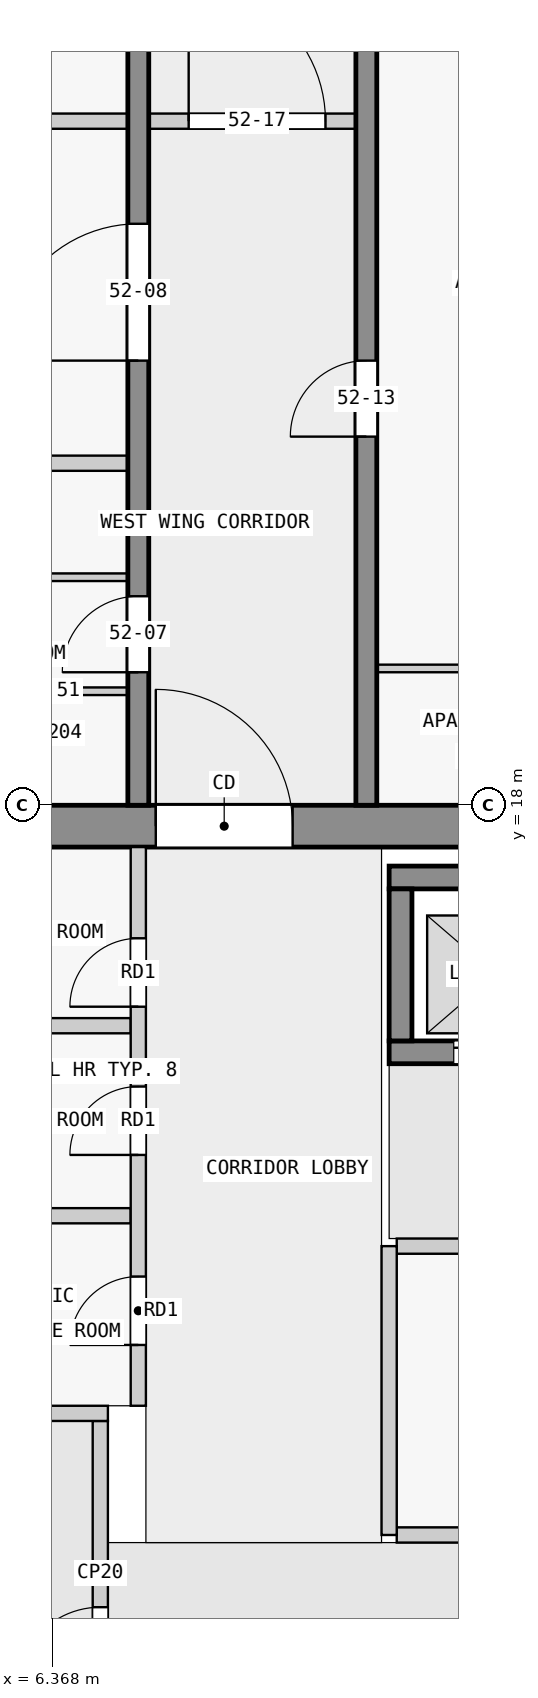
"""IFC4 building model, lengths in metres.
Left out: names, types, materials, properties, quantities, classifications, styles, units other than length and angle.
Written with IfcOpenShell. Run it as: python <this file> out.ifc"""

import sys

from ifc_helpers import new_model, si_unit, direction, frame, frame_2d, origin, place, context, subcontext, project, spatial, rectangle, extrude, element, fill, save


model = new_model("IFC4")
c1 = context("Model", 3, precision=1e-05, world=origin(), true_north=direction((0.0, 1.0)))
c2 = subcontext(c1, "Body", "Model", "MODEL_VIEW")
j1 = project(units=[si_unit("LENGTHUNIT", "METRE"), si_unit("PLANEANGLEUNIT", "RADIAN")], contexts=[c1])
p1 = place(None, origin())
s1 = spatial("IfcSite", under=j1, at=p1, CompositionType="ELEMENT")
p2 = place(p1, origin())
s2 = spatial("IfcBuilding", under=s1, at=p2, CompositionType="ELEMENT")
p3 = place(p2, frame((0.0, 0.0, 201.4)))
s3 = spatial("IfcBuildingStorey", under=s2, at=p3, CompositionType="ELEMENT", Elevation=201.4)
p4 = place(p3, frame((1.38, 17.725, 0.0), z_axis=(0.0, 0.0, 1.0), x_axis=(1.0, 0.0, 0.0)))
e1 = element("IfcWall", 1, at=p4, inside=s3, PredefinedType="SHEAR", context=c2, shape_type="SweptSolid", body=[
    extrude(rectangle(XDim=21.12, YDim=0.55, at=frame_2d((10.56, 0.0))), origin(), (0.0, 0.0, 1.0), 3.25),
])
p5 = place(p4, frame((6.35, 0.0, 0.0)))
e2 = element("IfcOpeningElement", 2, at=p5, cuts=e1, PredefinedType="OPENING", context=c2, shape_type="SweptSolid", body=[
    extrude(rectangle(XDim=1.8, YDim=2.1, at=frame_2d((0.9, 1.05))), frame((0.0, 0.285, 0.0), z_axis=(0.0, -1.0, 0.0), x_axis=(1.0, 0.0, 0.0)), (0.0, 0.0, 1.0), 0.57),
])
p6 = place(p3, frame((10.8, 17.05, 0.0), z_axis=(0.0, 0.0, 1.0), x_axis=(1.0, 0.0, 0.0)))
e3 = element("IfcWall", 3, at=p6, inside=s3, PredefinedType="SHEAR", context=c2, shape_type="SweptSolid", body=[
    extrude(rectangle(XDim=7.8, YDim=0.3, at=frame_2d((3.9, 0.0))), origin(), (0.0, 0.0, 1.0), 3.25),
])
p7 = place(p3, frame((10.8, 14.75, 0.0), z_axis=(0.0, 0.0, 1.0), x_axis=(1.0, 0.0, 0.0)))
e4 = element("IfcWall", 4, at=p7, inside=s3, PredefinedType="SHEAR", context=c2, shape_type="SweptSolid", body=[
    extrude(rectangle(XDim=7.8, YDim=0.3, at=frame_2d((3.9, 0.0))), origin(), (0.0, 0.0, 1.0), 3.25),
])
p8 = place(p7, frame((0.85, 0.0, 0.0)))
e5 = element("IfcOpeningElement", 5, at=p8, cuts=e4, PredefinedType="OPENING", context=c2, shape_type="SweptSolid", body=[
    extrude(rectangle(XDim=1.1, YDim=2.1, at=frame_2d((0.55, 1.05))), frame((0.0, 0.16, 0.0), z_axis=(0.0, -1.0, 0.0), x_axis=(1.0, 0.0, 0.0)), (0.0, 0.0, 1.0), 0.32),
])
p9 = place(p7, frame((3.35, 0.0, 0.0)))
e6 = element("IfcOpeningElement", 6, at=p9, cuts=e4, PredefinedType="OPENING", context=c2, shape_type="SweptSolid", body=[
    extrude(rectangle(XDim=1.1, YDim=2.1, at=frame_2d((0.55, 1.05))), frame((0.0, 0.16, 0.0), z_axis=(0.0, -1.0, 0.0), x_axis=(1.0, 0.0, 0.0)), (0.0, 0.0, 1.0), 0.32),
])
p10 = place(p7, frame((5.85, 0.0, 0.0)))
e7 = element("IfcOpeningElement", 7, at=p10, cuts=e4, PredefinedType="OPENING", context=c2, shape_type="SweptSolid", body=[
    extrude(rectangle(XDim=1.1, YDim=2.1, at=frame_2d((0.55, 1.05))), frame((0.0, 0.16, 0.0), z_axis=(0.0, -1.0, 0.0), x_axis=(1.0, 0.0, 0.0)), (0.0, 0.0, 1.0), 0.32),
])
p11 = place(p3, frame((10.95, 14.9, 0.0), z_axis=(0.0, 0.0, 1.0), x_axis=(0.0, 1.0, 0.0)))
e8 = element("IfcWall", 8, at=p11, inside=s3, PredefinedType="SHEAR", context=c2, shape_type="SweptSolid", body=[
    extrude(rectangle(XDim=2.0, YDim=0.3, at=frame_2d((1.0, 0.0))), origin(), (0.0, 0.0, 1.0), 3.25),
])
p12 = place(p3, frame((7.5, 18.0, 0.0), z_axis=(0.0, 0.0, 1.0), x_axis=(0.0, 1.0, 0.0)))
e9 = element("IfcWall", 9, at=p12, inside=s3, PredefinedType="SHEAR", context=c2, shape_type="SweptSolid", body=[
    extrude(rectangle(XDim=27.0, YDim=0.275, at=frame_2d((13.5, 0.0))), origin(), (0.0, 0.0, 1.0), 3.25),
])
p13 = place(p12, frame((1.75, 0.0, 0.0)))
e10 = element("IfcOpeningElement", 10, at=p13, cuts=e9, PredefinedType="OPENING", context=c2, shape_type="SweptSolid", body=[
    extrude(rectangle(XDim=1.0, YDim=2.1, at=frame_2d((0.5, 1.05))), frame((0.0, 0.147, 0.0), z_axis=(0.0, -1.0, 0.0), x_axis=(1.0, 0.0, 0.0)), (0.0, 0.0, 1.0), 0.295),
])
p14 = place(p12, frame((5.85, 0.0, 0.0)))
e11 = element("IfcOpeningElement", 11, at=p14, cuts=e9, PredefinedType="OPENING", context=c2, shape_type="SweptSolid", body=[
    extrude(rectangle(XDim=1.8, YDim=2.1, at=frame_2d((0.9, 1.05))), frame((0.0, 0.147, 0.0), z_axis=(0.0, -1.0, 0.0), x_axis=(1.0, 0.0, 0.0)), (0.0, 0.0, 1.0), 0.295),
])
p15 = place(p12, frame((13.05, 0.0, 0.0)))
e12 = element("IfcOpeningElement", 12, at=p15, cuts=e9, PredefinedType="OPENING", context=c2, shape_type="SweptSolid", body=[
    extrude(rectangle(XDim=1.0, YDim=2.1, at=frame_2d((0.5, 1.05))), frame((0.0, 0.147, 0.0), z_axis=(0.0, -1.0, 0.0), x_axis=(1.0, 0.0, 0.0)), (0.0, 0.0, 1.0), 0.295),
])
p16 = place(p12, frame((19.75, 0.0, 0.0)))
e13 = element("IfcOpeningElement", 13, at=p16, cuts=e9, PredefinedType="OPENING", context=c2, shape_type="SweptSolid", body=[
    extrude(rectangle(XDim=1.0, YDim=2.1, at=frame_2d((0.5, 1.05))), frame((0.0, 0.147, 0.0), z_axis=(0.0, -1.0, 0.0), x_axis=(1.0, 0.0, 0.0)), (0.0, 0.0, 1.0), 0.295),
])
p17 = place(p12, frame((23.25, 0.0, 0.0)))
e14 = element("IfcOpeningElement", 14, at=p17, cuts=e9, PredefinedType="OPENING", context=c2, shape_type="SweptSolid", body=[
    extrude(rectangle(XDim=0.9, YDim=2.1, at=frame_2d((0.45, 1.05))), frame((0.0, 0.147, 0.0), z_axis=(0.0, -1.0, 0.0), x_axis=(1.0, 0.0, 0.0)), (0.0, 0.0, 1.0), 0.295),
])
p18 = place(p12, frame((25.45, 0.0, 0.0)))
e15 = element("IfcOpeningElement", 15, at=p18, cuts=e9, PredefinedType="OPENING", context=c2, shape_type="SweptSolid", body=[
    extrude(rectangle(XDim=1.0, YDim=2.1, at=frame_2d((0.5, 1.05))), frame((0.0, 0.147, 0.0), z_axis=(0.0, -1.0, 0.0), x_axis=(1.0, 0.0, 0.0)), (0.0, 0.0, 1.0), 0.295),
])
p19 = place(p3, frame((10.5, 18.0, 0.0), z_axis=(0.0, 0.0, 1.0), x_axis=(0.0, 1.0, 0.0)))
e16 = element("IfcWall", 16, at=p19, inside=s3, PredefinedType="SHEAR", context=c2, shape_type="SweptSolid", body=[
    extrude(rectangle(XDim=27.0, YDim=0.275, at=frame_2d((13.5, 0.0))), origin(), (0.0, 0.0, 1.0), 3.25),
])
p20 = place(p19, frame((4.85, 0.0, 0.0)))
e17 = element("IfcOpeningElement", 17, at=p20, cuts=e16, PredefinedType="OPENING", context=c2, shape_type="SweptSolid", body=[
    extrude(rectangle(XDim=1.0, YDim=2.1, at=frame_2d((0.5, 1.05))), frame((0.0, 0.147, 0.0), z_axis=(0.0, -1.0, 0.0), x_axis=(1.0, 0.0, 0.0)), (0.0, 0.0, 1.0), 0.295),
])
p21 = place(p19, frame((15.25, 0.0, 0.0)))
e18 = element("IfcOpeningElement", 18, at=p21, cuts=e16, PredefinedType="OPENING", context=c2, shape_type="SweptSolid", body=[
    extrude(rectangle(XDim=1.0, YDim=2.1, at=frame_2d((0.5, 1.05))), frame((0.0, 0.147, 0.0), z_axis=(0.0, -1.0, 0.0), x_axis=(1.0, 0.0, 0.0)), (0.0, 0.0, 1.0), 0.295),
])
p22 = place(p19, frame((21.35, 0.0, 0.0)))
e19 = element("IfcOpeningElement", 19, at=p22, cuts=e16, PredefinedType="OPENING", context=c2, shape_type="SweptSolid", body=[
    extrude(rectangle(XDim=1.0, YDim=2.1, at=frame_2d((0.5, 1.05))), frame((0.0, 0.147, 0.0), z_axis=(0.0, -1.0, 0.0), x_axis=(1.0, 0.0, 0.0)), (0.0, 0.0, 1.0), 0.295),
])
p23 = place(p3, frame((7.0, 5.9, 0.0), z_axis=(0.0, 0.0, 1.0), x_axis=(0.0, 1.0, 0.0)))
e20 = element("IfcWall", 20, at=p23, inside=s3, PredefinedType="PARTITIONING", context=c2, shape_type="SweptSolid", body=[
    extrude(rectangle(XDim=4.0, YDim=0.2, at=frame_2d((2.0, 0.0))), origin(), (0.0, 0.0, 1.0), 3.25),
])
p24 = place(p23, frame((0.45, 0.0, 0.0)))
e21 = element("IfcOpeningElement", 21, at=p24, cuts=e20, PredefinedType="OPENING", context=c2, shape_type="SweptSolid", body=[
    extrude(rectangle(XDim=1.1, YDim=2.1, at=frame_2d((0.55, 1.05))), frame((0.0, 0.11, 0.0), z_axis=(0.0, -1.0, 0.0), x_axis=(1.0, 0.0, 0.0)), (0.0, 0.0, 1.0), 0.22),
])
p25 = place(p3, frame((5.15, 10.0, 0.0), z_axis=(0.0, 0.0, 1.0), x_axis=(1.0, 0.0, 0.0)))
e22 = element("IfcWall", 22, at=p25, inside=s3, PredefinedType="PARTITIONING", context=c2, shape_type="SweptSolid", body=[
    extrude(rectangle(XDim=1.95, YDim=0.2, at=frame_2d((0.975, 0.0))), origin(), (0.0, 0.0, 1.0), 3.25),
])
p26 = place(p3, frame((10.8, 8.4, 0.0), z_axis=(0.0, 0.0, 1.0), x_axis=(0.0, 1.0, 0.0)))
e23 = element("IfcWall", 23, at=p26, inside=s3, PredefinedType="PARTITIONING", context=c2, shape_type="SweptSolid", body=[
    extrude(rectangle(XDim=3.8, YDim=0.2, at=frame_2d((1.9, 0.0))), origin(), (0.0, 0.0, 1.0), 3.25),
])
p27 = place(p3, frame((10.9, 8.4, 0.0), z_axis=(0.0, 0.0, 1.0), x_axis=(1.0, 0.0, 0.0)))
e24 = element("IfcWall", 24, at=p27, inside=s3, PredefinedType="PARTITIONING", context=c2, shape_type="SweptSolid", body=[
    extrude(rectangle(XDim=8.55, YDim=0.2, at=frame_2d((4.275, 0.0))), origin(), (0.0, 0.0, 1.0), 3.25),
])
p28 = place(p3, frame((10.9, 12.2, 0.0), z_axis=(0.0, 0.0, 1.0), x_axis=(1.0, 0.0, 0.0)))
e25 = element("IfcWall", 25, at=p28, inside=s3, PredefinedType="PARTITIONING", context=c2, shape_type="SweptSolid", body=[
    extrude(rectangle(XDim=8.55, YDim=0.2, at=frame_2d((4.275, 0.0))), origin(), (0.0, 0.0, 1.0), 3.25),
])
p29 = place(p28, frame((1.425, 0.0, 0.0)))
e26 = element("IfcOpeningElement", 26, at=p29, cuts=e25, PredefinedType="OPENING", context=c2, shape_type="SweptSolid", body=[
    extrude(rectangle(XDim=0.9, YDim=2.1, at=frame_2d((0.45, 1.05))), frame((0.0, 0.11, 0.0), z_axis=(0.0, -1.0, 0.0), x_axis=(1.0, 0.0, 0.0)), (0.0, 0.0, 1.0), 0.22),
])
p30 = place(p28, frame((5.8, 0.0, 0.0)))
e27 = element("IfcOpeningElement", 27, at=p30, cuts=e25, PredefinedType="OPENING", context=c2, shape_type="SweptSolid", body=[
    extrude(rectangle(XDim=0.9, YDim=2.1, at=frame_2d((0.45, 1.05))), frame((0.0, 0.11, 0.0), z_axis=(0.0, -1.0, 0.0), x_axis=(1.0, 0.0, 0.0)), (0.0, 0.0, 1.0), 0.22),
])
p31 = place(p3, frame((7.5, 10.1, 0.0), z_axis=(0.0, 0.0, 1.0), x_axis=(0.0, 1.0, 0.0)))
e28 = element("IfcWall", 28, at=p31, inside=s3, PredefinedType="PARTITIONING", context=c2, shape_type="SweptSolid", body=[
    extrude(rectangle(XDim=7.35, YDim=0.2, at=frame_2d((3.675, 0.0))), origin(), (0.0, 0.0, 1.0), 3.25),
])
p32 = place(p31, frame((0.8, 0.0, 0.0)))
e29 = element("IfcOpeningElement", 29, at=p32, cuts=e28, PredefinedType="OPENING", context=c2, shape_type="SweptSolid", body=[
    extrude(rectangle(XDim=0.9, YDim=2.1, at=frame_2d((0.45, 1.05))), frame((0.0, 0.11, 0.0), z_axis=(0.0, -1.0, 0.0), x_axis=(1.0, 0.0, 0.0)), (0.0, 0.0, 1.0), 0.22),
])
p33 = place(p31, frame((3.3, 0.0, 0.0)))
e30 = element("IfcOpeningElement", 30, at=p33, cuts=e28, PredefinedType="OPENING", context=c2, shape_type="SweptSolid", body=[
    extrude(rectangle(XDim=0.9, YDim=2.1, at=frame_2d((0.45, 1.05))), frame((0.0, 0.11, 0.0), z_axis=(0.0, -1.0, 0.0), x_axis=(1.0, 0.0, 0.0)), (0.0, 0.0, 1.0), 0.22),
])
p34 = place(p31, frame((5.25, 0.0, 0.0)))
e31 = element("IfcOpeningElement", 31, at=p34, cuts=e28, PredefinedType="OPENING", context=c2, shape_type="SweptSolid", body=[
    extrude(rectangle(XDim=0.9, YDim=2.1, at=frame_2d((0.45, 1.05))), frame((0.0, 0.11, 0.0), z_axis=(0.0, -1.0, 0.0), x_axis=(1.0, 0.0, 0.0)), (0.0, 0.0, 1.0), 0.22),
])
for number, where, z_axis, x_axis in (
    (32, (5.15, 12.6, 0.0), (0.0, 0.0, 1.0), (1.0, 0.0, 0.0)),
    (33, (5.15, 15.1, 0.0), (0.0, 0.0, 1.0), (1.0, 0.0, 0.0)),
):
    element("IfcWall", number, at=place(p3, frame(where, z_axis=z_axis, x_axis=x_axis)), inside=s3, PredefinedType="PARTITIONING", context=c2, shape_type="SweptSolid", body=[
        extrude(rectangle(XDim=2.25, YDim=0.2, at=frame_2d((1.125, 0.0))), origin(), (0.0, 0.0, 1.0), 3.25),
    ])
p35 = place(p3, frame((7.363, 19.5, 0.0), z_axis=(0.0, 0.0, 1.0), x_axis=(-1.0, 0.0, 0.0)))
e34 = element("IfcWall", 34, at=p35, inside=s3, PredefinedType="PARTITIONING", context=c2, shape_type="SweptSolid", body=[
    extrude(rectangle(XDim=3.4, YDim=0.1, at=frame_2d((1.7, 0.0))), origin(), (0.0, 0.0, 1.0), 3.25),
])
p36 = place(p35, frame((1.25, 0.0, 0.0)))
e35 = element("IfcOpeningElement", 35, at=p36, cuts=e34, PredefinedType="OPENING", context=c2, shape_type="SweptSolid", body=[
    extrude(rectangle(XDim=0.9, YDim=2.1, at=frame_2d((0.45, 1.05))), frame((0.0, 0.06, 0.0), z_axis=(0.0, -1.0, 0.0), x_axis=(1.0, 0.0, 0.0)), (0.0, 0.0, 1.0), 0.12),
])
p37 = place(p3, frame((14.038, 19.8, 0.0), z_axis=(0.0, 0.0, 1.0), x_axis=(-1.0, 0.0, 0.0)))
e36 = element("IfcWall", 36, at=p37, inside=s3, PredefinedType="PARTITIONING", context=c2, shape_type="SweptSolid", body=[
    extrude(rectangle(XDim=3.4, YDim=0.1, at=frame_2d((1.7, 0.0))), origin(), (0.0, 0.0, 1.0), 3.25),
])
p38 = place(p37, frame((1.25, 0.0, 0.0)))
e37 = element("IfcOpeningElement", 37, at=p38, cuts=e36, PredefinedType="OPENING", context=c2, shape_type="SweptSolid", body=[
    extrude(rectangle(XDim=0.9, YDim=2.1, at=frame_2d((0.45, 1.05))), frame((0.0, 0.06, 0.0), z_axis=(0.0, -1.0, 0.0), x_axis=(1.0, 0.0, 0.0)), (0.0, 0.0, 1.0), 0.12),
])
p39 = place(p3, frame((3.962, 21.0, 0.0), z_axis=(0.0, 0.0, 1.0), x_axis=(1.0, 0.0, 0.0)))
e38 = element("IfcWall", 38, at=p39, inside=s3, PredefinedType="PARTITIONING", context=c2, shape_type="SweptSolid", body=[
    extrude(rectangle(XDim=3.4, YDim=0.1, at=frame_2d((1.7, 0.0))), origin(), (0.0, 0.0, 1.0), 3.25),
])
p40 = place(p39, frame((1.25, 0.0, 0.0)))
e39 = element("IfcOpeningElement", 39, at=p40, cuts=e38, PredefinedType="OPENING", context=c2, shape_type="SweptSolid", body=[
    extrude(rectangle(XDim=0.9, YDim=2.1, at=frame_2d((0.45, 1.05))), frame((0.0, 0.06, 0.0), z_axis=(0.0, -1.0, 0.0), x_axis=(1.0, 0.0, 0.0)), (0.0, 0.0, 1.0), 0.12),
])
p41 = place(p3, frame((7.363, 22.5, 0.0), z_axis=(0.0, 0.0, 1.0), x_axis=(-1.0, 0.0, 0.0)))
e40 = element("IfcWall", 40, at=p41, inside=s3, PredefinedType="PARTITIONING", context=c2, shape_type="SweptSolid", body=[
    extrude(rectangle(XDim=3.3, YDim=0.2, at=frame_2d((1.65, 0.0))), origin(), (0.0, 0.0, 1.0), 3.25),
])
p42 = place(p3, frame((7.363, 27.0, 0.0), z_axis=(0.0, 0.0, 1.0), x_axis=(-1.0, 0.0, 0.0)))
e41 = element("IfcWall", 41, at=p42, inside=s3, PredefinedType="PARTITIONING", context=c2, shape_type="SweptSolid", body=[
    extrude(rectangle(XDim=7.443, YDim=0.2, at=frame_2d((3.721, 0.0))), origin(), (0.0, 0.0, 1.0), 3.25),
])
p43 = place(p3, frame((7.462, 27.0, 0.0), z_axis=(0.0, 0.0, 1.0), x_axis=(1.0, 0.0, 0.0)))
e42 = element("IfcWall", 42, at=p43, inside=s3, PredefinedType="PARTITIONING", context=c2, shape_type="SweptSolid", body=[
    extrude(rectangle(XDim=3.175, YDim=0.2, at=frame_2d((1.587, 0.0))), origin(), (0.0, 0.0, 1.0), 3.25),
])
p44 = place(p43, frame((0.7, 0.0, 0.0)))
e43 = element("IfcOpeningElement", 43, at=p44, cuts=e42, PredefinedType="OPENING", context=c2, shape_type="SweptSolid", body=[
    extrude(rectangle(XDim=1.8, YDim=2.1, at=frame_2d((0.9, 1.05))), frame((0.0, 0.11, 0.0), z_axis=(0.0, -1.0, 0.0), x_axis=(1.0, 0.0, 0.0)), (0.0, 0.0, 1.0), 0.22),
])
p45 = place(p24, origin())
e44 = element("IfcDoor", 44, at=p45, inside=s3, OperationType="SINGLE_SWING_LEFT", PredefinedType="DOOR", context=c2, shape_type="SweptSolid", body=[
    extrude(rectangle(XDim=1.1, YDim=2.1, at=frame_2d((0.55, 1.05))), frame((0.0, 0.025, 0.0), z_axis=(0.0, -1.0, 0.0), x_axis=(1.0, 0.0, 0.0)), (0.0, 0.0, 1.0), 0.05),
])
fill(e21, e44)
p46 = place(p8, origin())
e45 = element("IfcDoor", 45, at=p46, inside=s3, OperationType="DOUBLE_DOOR_SLIDING", PredefinedType="DOOR", context=c2, shape_type="SweptSolid", body=[
    extrude(rectangle(XDim=1.1, YDim=2.1, at=frame_2d((0.55, 1.05))), frame((0.0, 0.025, 0.0), z_axis=(0.0, -1.0, 0.0), x_axis=(1.0, 0.0, 0.0)), (0.0, 0.0, 1.0), 0.05),
])
fill(e5, e45)
p47 = place(p5, origin())
e46 = element("IfcDoor", 46, at=p47, inside=s3, OperationType="DOUBLE_DOOR_SINGLE_SWING", PredefinedType="DOOR", context=c2, shape_type="SweptSolid", body=[
    extrude(rectangle(XDim=1.8, YDim=2.1, at=frame_2d((0.9, 1.05))), frame((0.0, 0.025, 0.0), z_axis=(0.0, -1.0, 0.0), x_axis=(1.0, 0.0, 0.0)), (0.0, 0.0, 1.0), 0.05),
])
fill(e2, e46)
p48 = place(p32, origin())
e47 = element("IfcDoor", 47, at=p48, inside=s3, OperationType="SINGLE_SWING_RIGHT", PredefinedType="DOOR", context=c2, shape_type="SweptSolid", body=[
    extrude(rectangle(XDim=0.9, YDim=2.1, at=frame_2d((0.45, 1.05))), frame((0.0, 0.025, 0.0), z_axis=(0.0, -1.0, 0.0), x_axis=(1.0, 0.0, 0.0)), (0.0, 0.0, 1.0), 0.05),
])
fill(e29, e47)
p49 = place(p33, origin())
e48 = element("IfcDoor", 48, at=p49, inside=s3, OperationType="SINGLE_SWING_RIGHT", PredefinedType="DOOR", context=c2, shape_type="SweptSolid", body=[
    extrude(rectangle(XDim=0.9, YDim=2.1, at=frame_2d((0.45, 1.05))), frame((0.0, 0.025, 0.0), z_axis=(0.0, -1.0, 0.0), x_axis=(1.0, 0.0, 0.0)), (0.0, 0.0, 1.0), 0.05),
])
fill(e30, e48)
p50 = place(p34, origin())
e49 = element("IfcDoor", 49, at=p50, inside=s3, OperationType="SINGLE_SWING_RIGHT", PredefinedType="DOOR", context=c2, shape_type="SweptSolid", body=[
    extrude(rectangle(XDim=0.9, YDim=2.1, at=frame_2d((0.45, 1.05))), frame((0.0, 0.025, 0.0), z_axis=(0.0, -1.0, 0.0), x_axis=(1.0, 0.0, 0.0)), (0.0, 0.0, 1.0), 0.05),
])
fill(e31, e49)
p51 = place(p13, origin())
e50 = element("IfcDoor", 50, at=p51, inside=s3, OperationType="SINGLE_SWING_LEFT", PredefinedType="DOOR", context=c2, shape_type="SweptSolid", body=[
    extrude(rectangle(XDim=1.0, YDim=2.1, at=frame_2d((0.5, 1.05))), frame((0.0, 0.025, 0.0), z_axis=(0.0, -1.0, 0.0), x_axis=(1.0, 0.0, 0.0)), (0.0, 0.0, 1.0), 0.05),
])
fill(e10, e50)
p52 = place(p14, origin())
e51 = element("IfcDoor", 51, at=p52, inside=s3, OperationType="SINGLE_SWING_LEFT", PredefinedType="DOOR", context=c2, shape_type="SweptSolid", body=[
    extrude(rectangle(XDim=1.8, YDim=2.1, at=frame_2d((0.9, 1.05))), frame((0.0, 0.025, 0.0), z_axis=(0.0, -1.0, 0.0), x_axis=(1.0, 0.0, 0.0)), (0.0, 0.0, 1.0), 0.05),
])
fill(e11, e51)
p53 = place(p20, origin())
e52 = element("IfcDoor", 52, at=p53, inside=s3, OperationType="SINGLE_SWING_LEFT", PredefinedType="DOOR", context=c2, shape_type="SweptSolid", body=[
    extrude(rectangle(XDim=1.0, YDim=2.1, at=frame_2d((0.5, 1.05))), frame((0.0, 0.025, 0.0), z_axis=(0.0, -1.0, 0.0), x_axis=(1.0, 0.0, 0.0)), (0.0, 0.0, 1.0), 0.05),
])
fill(e17, e52)
p54 = place(p44, origin())
e53 = element("IfcDoor", 53, at=p54, inside=s3, OperationType="SINGLE_SWING_RIGHT", PredefinedType="DOOR", context=c2, shape_type="SweptSolid", body=[
    extrude(rectangle(XDim=1.8, YDim=2.1, at=frame_2d((0.9, 1.05))), frame((0.0, 0.025, 0.0), z_axis=(0.0, -1.0, 0.0), x_axis=(1.0, 0.0, 0.0)), (0.0, 0.0, 1.0), 0.05),
])
fill(e43, e53)
save(model, sys.argv[1])
